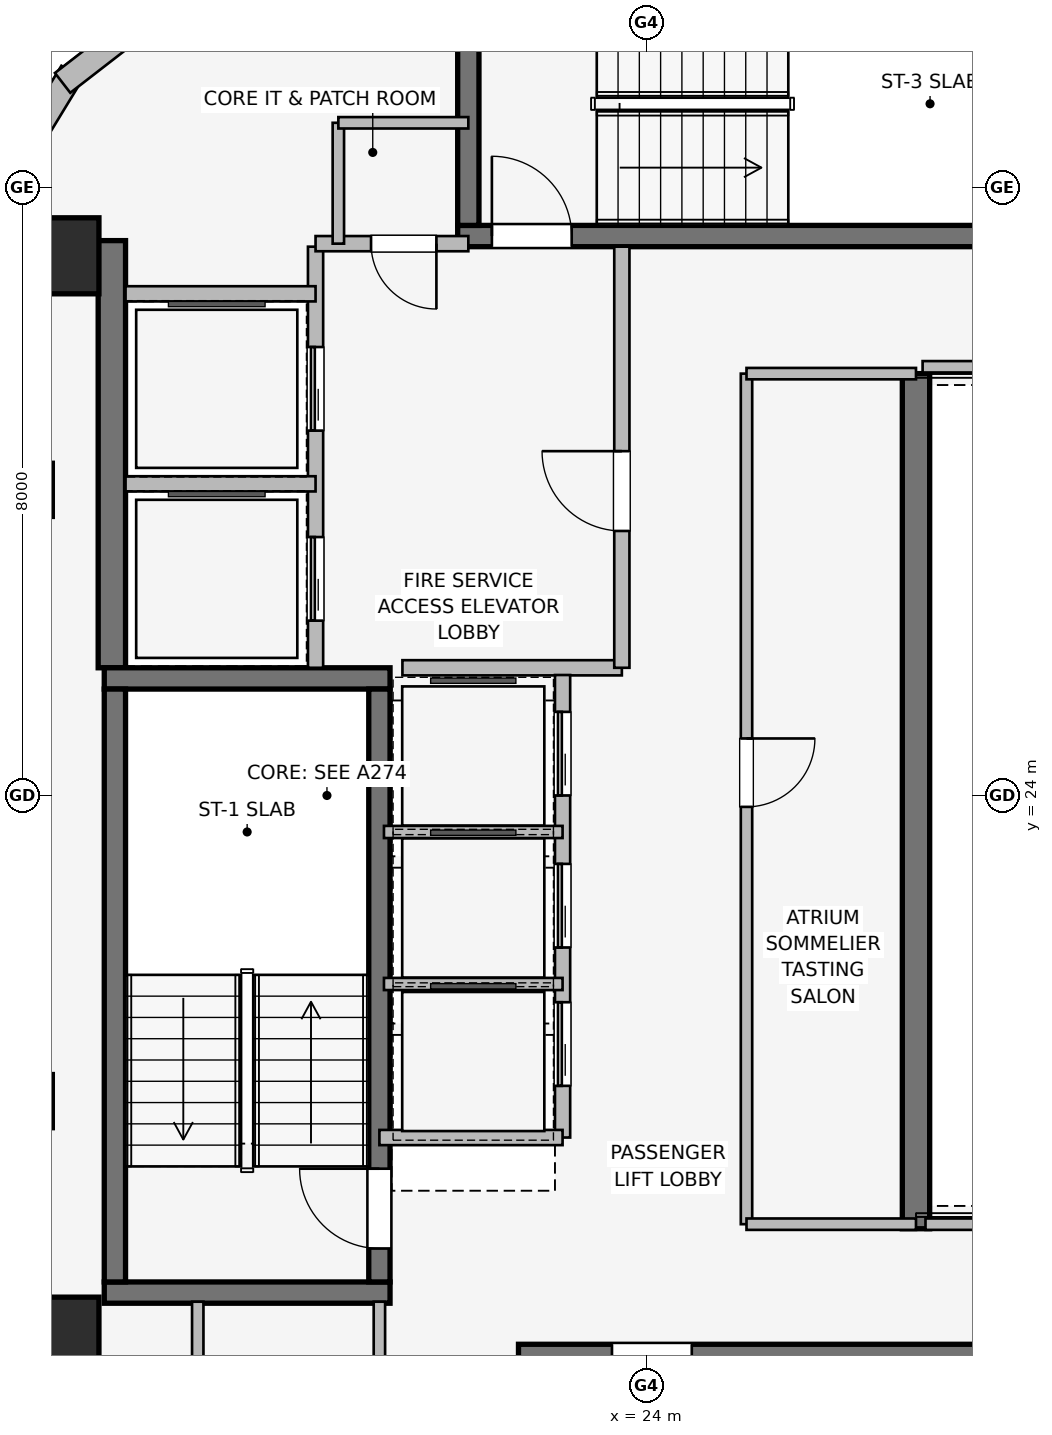
"""IFC4 building model, lengths in metres.
Left out: names, types, materials, properties, quantities, classifications, styles, units other than length and angle.
Written with IfcOpenShell. Run it as: python <this file> out.ifc"""

import sys

from ifc_helpers import new_model, si_unit, direction, frame, frame_2d, origin, origin_2d, place, context, subcontext, project, spatial, rectangle, extrude, element, fill, save


model = new_model("IFC4")
c1 = context("Model", 3, precision=1e-05, world=origin(), true_north=direction((0.0, 1.0)))
c2 = subcontext(c1, "Body", "Model", "MODEL_VIEW")
j1 = project(units=[si_unit("LENGTHUNIT", "METRE"), si_unit("PLANEANGLEUNIT", "RADIAN")], contexts=[c1])
p1 = place(None, origin())
s1 = spatial("IfcSite", under=j1, at=p1, CompositionType="ELEMENT")
p2 = place(p1, origin())
s2 = spatial("IfcBuilding", under=s1, at=p2, CompositionType="ELEMENT")
p3 = place(p2, frame((0.0, 0.0, 263.2)))
s3 = spatial("IfcBuildingStorey", under=s2, at=p3, CompositionType="ELEMENT", Elevation=263.2)
p4 = place(p3, frame((16.97, 25.68, 0.0), z_axis=(0.0, 0.0, 1.0), x_axis=(0.0, 1.0, 0.0)))
e1 = element("IfcWall", 1, at=p4, inside=s3, PredefinedType="SHEAR", context=c2, shape_type="SweptSolid", body=[
    extrude(rectangle(XDim=5.62, YDim=0.36, at=frame_2d((2.81, 0.0))), origin(), (0.0, 0.0, 1.0), 3.55),
])
p5 = place(p3, frame((27.55, 29.55, 0.0), z_axis=(0.0, 0.0, 1.0), x_axis=(0.0, -1.0, 0.0)))
e2 = element("IfcWall", 2, at=p5, inside=s3, PredefinedType="SHEAR", context=c2, shape_type="SweptSolid", body=[
    extrude(rectangle(XDim=11.25, YDim=0.36, at=frame_2d((5.625, 0.0))), origin(), (0.0, 0.0, 1.0), 3.55),
])
for number, where, z_axis, x_axis in (
    (3, (16.87, 17.46, 0.0), (0.0, 0.0, 1.0), (1.0, 0.0, 0.0)),
    (4, (20.63, 25.54, 0.0), (0.0, 0.0, 1.0), (-1.0, 0.0, 0.0)),
):
    element("IfcWall", number, at=place(p3, frame(where, z_axis=z_axis, x_axis=x_axis)), inside=s3, PredefinedType="SHEAR", context=c2, shape_type="SweptSolid", body=[
        extrude(rectangle(XDim=3.76, YDim=0.28, at=frame_2d((1.88, 0.0))), origin(), (0.0, 0.0, 1.0), 3.55),
    ])
p6 = place(p3, frame((17.01, 25.4, 0.0), z_axis=(0.0, 0.0, 1.0), x_axis=(0.0, -1.0, 0.0)))
e5 = element("IfcWall", 5, at=p6, inside=s3, PredefinedType="SHEAR", context=c2, shape_type="SweptSolid", body=[
    extrude(rectangle(XDim=7.8, YDim=0.28, at=frame_2d((3.9, 0.0))), origin(), (0.0, 0.0, 1.0), 3.55),
])
p7 = place(p3, frame((20.49, 17.6, 0.0), z_axis=(0.0, 0.0, 1.0), x_axis=(0.0, 1.0, 0.0)))
e6 = element("IfcWall", 6, at=p7, inside=s3, PredefinedType="SHEAR", context=c2, shape_type="SweptSolid", body=[
    extrude(rectangle(XDim=7.8, YDim=0.28, at=frame_2d((3.9, 0.0))), origin(), (0.0, 0.0, 1.0), 3.55),
])
p8 = place(p7, frame((0.44, 0.0, 0.0)))
e7 = element("IfcOpeningElement", 7, at=p8, cuts=e6, PredefinedType="OPENING", context=c2, shape_type="SweptSolid", body=[
    extrude(rectangle(XDim=1.05, YDim=2.0, at=frame_2d((0.525, 1.0))), frame((0.0, 0.15, 0.0), z_axis=(0.0, -1.0, 0.0), x_axis=(1.0, 0.0, 0.0)), (0.0, 0.0, 1.0), 0.3),
])
p9 = place(p3, frame((30.68, 16.64, 0.0), z_axis=(0.0, 0.0, 1.0), x_axis=(-1.0, 0.0, 0.0)))
e8 = element("IfcWall", 8, at=p9, inside=s3, PredefinedType="SHEAR", context=c2, shape_type="SweptSolid", body=[
    extrude(rectangle(XDim=8.36, YDim=0.28, at=frame_2d((4.18, 0.0))), origin(), (0.0, 0.0, 1.0), 3.55),
])
p10 = place(p9, frame((6.08, 0.0, 0.0)))
e9 = element("IfcOpeningElement", 9, at=p10, cuts=e8, PredefinedType="OPENING", context=c2, shape_type="SweptSolid", body=[
    extrude(rectangle(XDim=1.05, YDim=2.0, at=frame_2d((0.525, 1.0))), frame((0.0, 0.15, 0.0), z_axis=(0.0, -1.0, 0.0), x_axis=(1.0, 0.0, 0.0)), (0.0, 0.0, 1.0), 0.3),
])
p11 = place(p3, frame((21.52, 31.36, 0.0), z_axis=(0.0, 0.0, 1.0), x_axis=(1.0, 0.0, 0.0)))
e10 = element("IfcWall", 10, at=p11, inside=s3, PredefinedType="SHEAR", context=c2, shape_type="SweptSolid", body=[
    extrude(rectangle(XDim=8.36, YDim=0.28, at=frame_2d((4.18, 0.0))), origin(), (0.0, 0.0, 1.0), 3.55),
])
p12 = place(p11, frame((0.45, 0.0, 0.0)))
e11 = element("IfcOpeningElement", 11, at=p12, cuts=e10, PredefinedType="OPENING", context=c2, shape_type="SweptSolid", body=[
    extrude(rectangle(XDim=1.05, YDim=2.0, at=frame_2d((0.525, 1.0))), frame((0.0, 0.15, 0.0), z_axis=(0.0, -1.0, 0.0), x_axis=(1.0, 0.0, 0.0)), (0.0, 0.0, 1.0), 0.3),
])
p13 = place(p3, frame((21.66, 34.7, 0.0), z_axis=(0.0, 0.0, 1.0), x_axis=(0.0, -1.0, 0.0)))
e12 = element("IfcWall", 12, at=p13, inside=s3, PredefinedType="SHEAR", context=c2, shape_type="SweptSolid", body=[
    extrude(rectangle(XDim=3.2, YDim=0.28, at=frame_2d((1.6, 0.0))), origin(), (0.0, 0.0, 1.0), 3.55),
])
for number, where, z_axis, x_axis in (
    (13, (16.3, 16.9, 0.0), (0.0, 0.0, 1.0), (1.0, 0.0, 0.0)),
    (14, (16.3, 31.1, 0.0), (0.0, 0.0, 1.0), (1.0, 0.0, 0.0)),
):
    element("IfcColumn", number, at=place(p3, frame(where, z_axis=z_axis, x_axis=x_axis)), inside=s3, PredefinedType="COLUMN", context=c2, shape_type="SweptSolid", body=[
        extrude(rectangle(XDim=1.0, YDim=1.0, at=origin_2d()), origin(), (0.0, 0.0, 1.0), 3.55),
    ])
p14 = place(p3, frame((15.574, 32.082, 0.0), z_axis=(0.0, 0.0, 1.0), x_axis=(0.520325409202, 0.853968072318, 0.0)))
e15 = element("IfcWall", 15, at=p14, inside=s3, PredefinedType="STANDARD", context=c2, shape_type="SweptSolid", body=[
    extrude(rectangle(XDim=1.678, YDim=0.33, at=frame_2d((0.839, 0.0))), origin(), (0.0, 0.0, 1.0), 3.29),
])
p15 = place(p3, frame((16.322, 33.375, 0.0), z_axis=(0.0, 0.0, 1.0), x_axis=(0.790691856293, 0.61221433207, 0.0)))
e16 = element("IfcWall", 16, at=p15, inside=s3, PredefinedType="STANDARD", context=c2, shape_type="SweptSolid", body=[
    extrude(rectangle(XDim=1.676, YDim=0.33, at=frame_2d((0.838, 0.0))), origin(), (0.0, 0.0, 1.0), 3.29),
])
p16 = place(p3, frame((19.65, 25.68, 0.0), z_axis=(0.0, 0.0, 1.0), x_axis=(0.0, 1.0, 0.0)))
e17 = element("IfcWall", 17, at=p16, inside=s3, PredefinedType="PARTITIONING", context=c2, shape_type="SweptSolid", body=[
    extrude(rectangle(XDim=5.54, YDim=0.2, at=frame_2d((2.77, 0.0))), origin(), (0.0, 0.0, 1.0), 3.29),
])
p17 = place(p16, frame((0.62, 0.0, 0.0)))
e18 = element("IfcOpeningElement", 18, at=p17, cuts=e17, PredefinedType="OPENING", context=c2, shape_type="SweptSolid", body=[
    extrude(rectangle(XDim=1.1, YDim=2.2, at=frame_2d((0.55, 1.1))), frame((0.0, 0.11, 0.0), z_axis=(0.0, -1.0, 0.0), x_axis=(1.0, 0.0, 0.0)), (0.0, 0.0, 1.0), 0.22),
])
p18 = place(p16, frame((3.12, 0.0, 0.0)))
e19 = element("IfcOpeningElement", 19, at=p18, cuts=e17, PredefinedType="OPENING", context=c2, shape_type="SweptSolid", body=[
    extrude(rectangle(XDim=1.1, YDim=2.2, at=frame_2d((0.55, 1.1))), frame((0.0, 0.11, 0.0), z_axis=(0.0, -1.0, 0.0), x_axis=(1.0, 0.0, 0.0)), (0.0, 0.0, 1.0), 0.22),
])
p19 = place(p3, frame((20.793, 25.68, 0.0), z_axis=(0.0, 0.0, 1.0), x_axis=(1.0, 0.0, 0.0)))
e20 = element("IfcWall", 20, at=p19, inside=s3, PredefinedType="PARTITIONING", context=c2, shape_type="SweptSolid", body=[
    extrude(rectangle(XDim=2.887, YDim=0.2, at=frame_2d((1.443, 0.0))), origin(), (0.0, 0.0, 1.0), 3.29),
])
p20 = place(p3, frame((23.68, 25.68, 0.0), z_axis=(0.0, 0.0, 1.0), x_axis=(0.0, 1.0, 0.0)))
e21 = element("IfcWall", 21, at=p20, inside=s3, PredefinedType="PARTITIONING", context=c2, shape_type="SweptSolid", body=[
    extrude(rectangle(XDim=5.54, YDim=0.2, at=frame_2d((2.77, 0.0))), origin(), (0.0, 0.0, 1.0), 3.29),
])
p21 = place(p20, frame((1.8, 0.0, 0.0)))
e22 = element("IfcOpeningElement", 22, at=p21, cuts=e21, PredefinedType="OPENING", context=c2, shape_type="SweptSolid", body=[
    extrude(rectangle(XDim=1.05, YDim=2.0, at=frame_2d((0.525, 1.0))), frame((0.0, 0.11, 0.0), z_axis=(0.0, -1.0, 0.0), x_axis=(1.0, 0.0, 0.0)), (0.0, 0.0, 1.0), 0.22),
])
p22 = place(p3, frame((21.66, 31.26, 0.0), z_axis=(0.0, 0.0, 1.0), x_axis=(-1.0, 0.0, 0.0)))
e23 = element("IfcWall", 23, at=p22, inside=s3, PredefinedType="PARTITIONING", context=c2, shape_type="SweptSolid", body=[
    extrude(rectangle(XDim=2.01, YDim=0.2, at=frame_2d((1.005, 0.0))), origin(), (0.0, 0.0, 1.0), 3.29),
])
p23 = place(p22, frame((0.42, 0.0, 0.0)))
e24 = element("IfcOpeningElement", 24, at=p23, cuts=e23, PredefinedType="OPENING", context=c2, shape_type="SweptSolid", body=[
    extrude(rectangle(XDim=0.86, YDim=2.0, at=frame_2d((0.43, 1.0))), frame((0.0, 0.11, 0.0), z_axis=(0.0, -1.0, 0.0), x_axis=(1.0, 0.0, 0.0)), (0.0, 0.0, 1.0), 0.22),
])
p24 = place(p3, frame((17.15, 28.1, 0.0), z_axis=(0.0, 0.0, 1.0), x_axis=(1.0, 0.0, 0.0)))
e25 = element("IfcWall", 25, at=p24, inside=s3, PredefinedType="PARTITIONING", context=c2, shape_type="SweptSolid", body=[
    extrude(rectangle(XDim=2.5, YDim=0.2, at=frame_2d((1.25, 0.0))), origin(), (0.0, 0.0, 1.0), 3.29),
])
p25 = place(p3, frame((19.65, 30.6, 0.0), z_axis=(0.0, 0.0, 1.0), x_axis=(-1.0, 0.0, 0.0)))
e26 = element("IfcWall", 26, at=p25, inside=s3, PredefinedType="PARTITIONING", context=c2, shape_type="SweptSolid", body=[
    extrude(rectangle(XDim=2.5, YDim=0.2, at=frame_2d((1.25, 0.0))), origin(), (0.0, 0.0, 1.0), 2.19),
])
p26 = place(p3, frame((22.9, 19.5, 0.0), z_axis=(0.0, 0.0, 1.0), x_axis=(0.0, 1.0, 0.0)))
e27 = element("IfcWall", 27, at=p26, inside=s3, PredefinedType="PARTITIONING", context=c2, shape_type="SweptSolid", body=[
    extrude(rectangle(XDim=6.085, YDim=0.2, at=frame_2d((3.042, 0.0))), origin(), (0.0, 0.0, 1.0), 3.29),
])
p27 = place(p26, frame((0.68, 0.0, 0.0)))
e28 = element("IfcOpeningElement", 28, at=p27, cuts=e27, PredefinedType="OPENING", context=c2, shape_type="SweptSolid", body=[
    extrude(rectangle(XDim=1.1, YDim=2.2, at=frame_2d((0.55, 1.1))), frame((0.0, 0.11, 0.0), z_axis=(0.0, -1.0, 0.0), x_axis=(1.0, 0.0, 0.0)), (0.0, 0.0, 1.0), 0.22),
])
p28 = place(p26, frame((2.5, 0.0, 0.0)))
e29 = element("IfcOpeningElement", 29, at=p28, cuts=e27, PredefinedType="OPENING", context=c2, shape_type="SweptSolid", body=[
    extrude(rectangle(XDim=1.1, YDim=2.2, at=frame_2d((0.55, 1.1))), frame((0.0, 0.11, 0.0), z_axis=(0.0, -1.0, 0.0), x_axis=(1.0, 0.0, 0.0)), (0.0, 0.0, 1.0), 0.22),
])
p29 = place(p26, frame((4.5, 0.0, 0.0)))
e30 = element("IfcOpeningElement", 30, at=p29, cuts=e27, PredefinedType="OPENING", context=c2, shape_type="SweptSolid", body=[
    extrude(rectangle(XDim=1.1, YDim=2.2, at=frame_2d((0.55, 1.1))), frame((0.0, 0.11, 0.0), z_axis=(0.0, -1.0, 0.0), x_axis=(1.0, 0.0, 0.0)), (0.0, 0.0, 1.0), 0.22),
])
p30 = place(p3, frame((20.49, 19.5, 0.0), z_axis=(0.0, 0.0, 1.0), x_axis=(1.0, 0.0, 0.0)))
e31 = element("IfcWall", 31, at=p30, inside=s3, PredefinedType="PARTITIONING", context=c2, shape_type="SweptSolid", body=[
    extrude(rectangle(XDim=2.41, YDim=0.2, at=frame_2d((1.205, 0.0))), origin(), (0.0, 0.0, 1.0), 2.19),
])
for number, where, z_axis, x_axis in (
    (32, (20.55, 21.52, 0.0), (0.0, 0.0, 1.0), (1.0, 0.0, 0.0)),
    (33, (20.55, 23.52, 0.0), (0.0, 0.0, 1.0), (1.0, 0.0, 0.0)),
):
    element("IfcWall", number, at=place(p3, frame(where, z_axis=z_axis, x_axis=x_axis)), inside=s3, PredefinedType="PARTITIONING", context=c2, shape_type="SweptSolid", body=[
        extrude(rectangle(XDim=2.35, YDim=0.16, at=frame_2d((1.175, 0.0))), origin(), (0.0, 0.0, 1.0), 3.29),
    ])
p31 = place(p3, frame((25.32, 29.55, 0.0), z_axis=(0.0, 0.0, 1.0), x_axis=(0.0, -1.0, 0.0)))
e34 = element("IfcWall", 34, at=p31, inside=s3, PredefinedType="PARTITIONING", context=c2, shape_type="SweptSolid", body=[
    extrude(rectangle(XDim=11.19, YDim=0.15, at=frame_2d((5.595, 0.0))), origin(), (0.0, 0.0, 1.0), 3.29),
])
p32 = place(p31, frame((4.8, 0.0, 0.0)))
e35 = element("IfcOpeningElement", 35, at=p32, cuts=e34, PredefinedType="OPENING", context=c2, shape_type="SweptSolid", body=[
    extrude(rectangle(XDim=0.9, YDim=2.0, at=frame_2d((0.45, 1.0))), frame((0.0, 0.085, 0.0), z_axis=(0.0, -1.0, 0.0), x_axis=(1.0, 0.0, 0.0)), (0.0, 0.0, 1.0), 0.17),
])
p33 = place(p3, frame((25.32, 18.36, 0.0), z_axis=(0.0, 0.0, 1.0), x_axis=(1.0, 0.0, 0.0)))
e36 = element("IfcWall", 36, at=p33, inside=s3, PredefinedType="PARTITIONING", context=c2, shape_type="SweptSolid", body=[
    extrude(rectangle(XDim=2.23, YDim=0.15, at=frame_2d((1.115, 0.0))), origin(), (0.0, 0.0, 1.0), 3.29),
])
p34 = place(p3, frame((27.55, 29.55, 0.0), z_axis=(0.0, 0.0, 1.0), x_axis=(-1.0, 0.0, 0.0)))
e37 = element("IfcWall", 37, at=p34, inside=s3, PredefinedType="PARTITIONING", context=c2, shape_type="SweptSolid", body=[
    extrude(rectangle(XDim=2.23, YDim=0.15, at=frame_2d((1.115, 0.0))), origin(), (0.0, 0.0, 1.0), 2.19),
])
p35 = place(p3, frame((18.1, 17.34, 0.0), z_axis=(0.0, 0.0, 1.0), x_axis=(0.0, -1.0, 0.0)))
e38 = element("IfcWall", 38, at=p35, inside=s3, PredefinedType="PARTITIONING", context=c2, shape_type="SweptSolid", body=[
    extrude(rectangle(XDim=4.133, YDim=0.15, at=frame_2d((2.066, 0.0))), origin(), (0.0, 0.0, 1.0), 3.29),
])
p36 = place(p3, frame((20.49, 13.2, 0.0), z_axis=(0.0, 0.0, 1.0), x_axis=(0.0, 1.0, 0.0)))
e39 = element("IfcWall", 39, at=p36, inside=s3, PredefinedType="PARTITIONING", context=c2, shape_type="SweptSolid", body=[
    extrude(rectangle(XDim=4.14, YDim=0.15, at=frame_2d((2.07, 0.0))), origin(), (0.0, 0.0, 1.0), 3.29),
])
p37 = place(p36, frame((1.25, 0.0, 0.0)))
e40 = element("IfcOpeningElement", 40, at=p37, cuts=e39, PredefinedType="OPENING", context=c2, shape_type="SweptSolid", body=[
    extrude(rectangle(XDim=0.9, YDim=2.0, at=frame_2d((0.45, 1.0))), frame((0.0, 0.085, 0.0), z_axis=(0.0, -1.0, 0.0), x_axis=(1.0, 0.0, 0.0)), (0.0, 0.0, 1.0), 0.17),
])
p38 = place(p3, frame((19.95, 32.85, 0.0), z_axis=(0.0, 0.0, 1.0), x_axis=(0.0, -1.0, 0.0)))
e41 = element("IfcWall", 41, at=p38, inside=s3, PredefinedType="PARTITIONING", context=c2, shape_type="SweptSolid", body=[
    extrude(rectangle(XDim=1.59, YDim=0.15, at=frame_2d((0.795, 0.0))), origin(), (0.0, 0.0, 1.0), 3.29),
])
p39 = place(p3, frame((21.66, 32.85, 0.0), z_axis=(0.0, 0.0, 1.0), x_axis=(-1.0, 0.0, 0.0)))
e42 = element("IfcWall", 42, at=p39, inside=s3, PredefinedType="PARTITIONING", context=c2, shape_type="SweptSolid", body=[
    extrude(rectangle(XDim=1.71, YDim=0.15, at=frame_2d((0.855, 0.0))), origin(), (0.0, 0.0, 1.0), 3.29),
])
p40 = place(p3, frame((27.675, 18.36, 0.0), z_axis=(0.0, 0.0, 1.0), x_axis=(1.0, 0.0, 0.0)))
e43 = element("IfcWall", 43, at=p40, inside=s3, PredefinedType="PARTITIONING", context=c2, shape_type="SweptSolid", body=[
    extrude(rectangle(XDim=12.165, YDim=0.15, at=frame_2d((6.083, 0.0))), origin(), (0.0, 0.0, 1.0), 2.431),
])
p41 = place(p3, frame((39.84, 29.64, 0.0), z_axis=(0.0, 0.0, 1.0), x_axis=(-1.0, 0.0, 0.0)))
e44 = element("IfcWall", 44, at=p41, inside=s3, PredefinedType="PARTITIONING", context=c2, shape_type="SweptSolid", body=[
    extrude(rectangle(XDim=12.203, YDim=0.15, at=frame_2d((6.102, 0.0))), origin(), (0.0, 0.0, 1.0), 2.431),
])
p42 = place(p8, origin())
e45 = element("IfcDoor", 45, at=p42, inside=s3, OperationType="SINGLE_SWING_RIGHT", PredefinedType="DOOR", context=c2, shape_type="SweptSolid", body=[
    extrude(rectangle(XDim=1.05, YDim=2.0, at=frame_2d((0.525, 1.0))), frame((0.0, 0.025, 0.0), z_axis=(0.0, -1.0, 0.0), x_axis=(1.0, 0.0, 0.0)), (0.0, 0.0, 1.0), 0.05),
])
fill(e7, e45)
p43 = place(p10, origin())
e46 = element("IfcDoor", 46, at=p43, inside=s3, OperationType="SINGLE_SWING_RIGHT", PredefinedType="DOOR", context=c2, shape_type="SweptSolid", body=[
    extrude(rectangle(XDim=1.05, YDim=2.0, at=frame_2d((0.525, 1.0))), frame((0.0, 0.025, 0.0), z_axis=(0.0, -1.0, 0.0), x_axis=(1.0, 0.0, 0.0)), (0.0, 0.0, 1.0), 0.05),
])
fill(e9, e46)
p44 = place(p12, origin())
e47 = element("IfcDoor", 47, at=p44, inside=s3, OperationType="SINGLE_SWING_LEFT", PredefinedType="DOOR", context=c2, shape_type="SweptSolid", body=[
    extrude(rectangle(XDim=1.05, YDim=2.0, at=frame_2d((0.525, 1.0))), frame((0.0, 0.025, 0.0), z_axis=(0.0, -1.0, 0.0), x_axis=(1.0, 0.0, 0.0)), (0.0, 0.0, 1.0), 0.05),
])
fill(e11, e47)
p45 = place(p17, origin())
e48 = element("IfcDoor", 48, at=p45, inside=s3, OperationType="SLIDING_TO_LEFT", PredefinedType="DOOR", context=c2, shape_type="SweptSolid", body=[
    extrude(rectangle(XDim=1.1, YDim=2.2, at=frame_2d((0.55, 1.1))), frame((0.0, 0.025, 0.0), z_axis=(0.0, -1.0, 0.0), x_axis=(1.0, 0.0, 0.0)), (0.0, 0.0, 1.0), 0.05),
])
fill(e18, e48)
p46 = place(p18, origin())
e49 = element("IfcDoor", 49, at=p46, inside=s3, OperationType="SLIDING_TO_LEFT", PredefinedType="DOOR", context=c2, shape_type="SweptSolid", body=[
    extrude(rectangle(XDim=1.1, YDim=2.2, at=frame_2d((0.55, 1.1))), frame((0.0, 0.025, 0.0), z_axis=(0.0, -1.0, 0.0), x_axis=(1.0, 0.0, 0.0)), (0.0, 0.0, 1.0), 0.05),
])
fill(e19, e49)
p47 = place(p21, origin())
e50 = element("IfcDoor", 50, at=p47, inside=s3, OperationType="SINGLE_SWING_RIGHT", PredefinedType="DOOR", context=c2, shape_type="SweptSolid", body=[
    extrude(rectangle(XDim=1.05, YDim=2.0, at=frame_2d((0.525, 1.0))), frame((0.0, 0.025, 0.0), z_axis=(0.0, -1.0, 0.0), x_axis=(1.0, 0.0, 0.0)), (0.0, 0.0, 1.0), 0.05),
])
fill(e22, e50)
p48 = place(p23, origin())
e51 = element("IfcDoor", 51, at=p48, inside=s3, OperationType="SINGLE_SWING_LEFT", PredefinedType="DOOR", context=c2, shape_type="SweptSolid", body=[
    extrude(rectangle(XDim=0.86, YDim=2.0, at=frame_2d((0.43, 1.0))), frame((0.0, 0.025, 0.0), z_axis=(0.0, -1.0, 0.0), x_axis=(1.0, 0.0, 0.0)), (0.0, 0.0, 1.0), 0.05),
])
fill(e24, e51)
p49 = place(p27, origin())
e52 = element("IfcDoor", 52, at=p49, inside=s3, OperationType="SLIDING_TO_LEFT", PredefinedType="DOOR", context=c2, shape_type="SweptSolid", body=[
    extrude(rectangle(XDim=1.1, YDim=2.2, at=frame_2d((0.55, 1.1))), frame((0.0, 0.025, 0.0), z_axis=(0.0, -1.0, 0.0), x_axis=(1.0, 0.0, 0.0)), (0.0, 0.0, 1.0), 0.05),
])
fill(e28, e52)
p50 = place(p28, origin())
e53 = element("IfcDoor", 53, at=p50, inside=s3, OperationType="SLIDING_TO_LEFT", PredefinedType="DOOR", context=c2, shape_type="SweptSolid", body=[
    extrude(rectangle(XDim=1.1, YDim=2.2, at=frame_2d((0.55, 1.1))), frame((0.0, 0.025, 0.0), z_axis=(0.0, -1.0, 0.0), x_axis=(1.0, 0.0, 0.0)), (0.0, 0.0, 1.0), 0.05),
])
fill(e29, e53)
p51 = place(p29, origin())
e54 = element("IfcDoor", 54, at=p51, inside=s3, OperationType="SLIDING_TO_LEFT", PredefinedType="DOOR", context=c2, shape_type="SweptSolid", body=[
    extrude(rectangle(XDim=1.1, YDim=2.2, at=frame_2d((0.55, 1.1))), frame((0.0, 0.025, 0.0), z_axis=(0.0, -1.0, 0.0), x_axis=(1.0, 0.0, 0.0)), (0.0, 0.0, 1.0), 0.05),
])
fill(e30, e54)
p52 = place(p32, origin())
e55 = element("IfcDoor", 55, at=p52, inside=s3, OperationType="SINGLE_SWING_LEFT", PredefinedType="DOOR", context=c2, shape_type="SweptSolid", body=[
    extrude(rectangle(XDim=0.9, YDim=2.0, at=frame_2d((0.45, 1.0))), frame((0.0, 0.025, 0.0), z_axis=(0.0, -1.0, 0.0), x_axis=(1.0, 0.0, 0.0)), (0.0, 0.0, 1.0), 0.05),
])
fill(e35, e55)
save(model, sys.argv[1])
